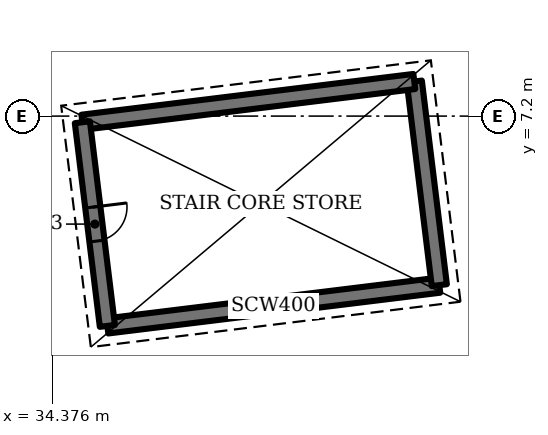
"""IFC4 building model, lengths in metres.
Left out: names, types, materials, properties, quantities, classifications, styles, units other than length and angle.
Written with IfcOpenShell. Run it as: python <this file> out.ifc"""

import sys

from ifc_helpers import new_model, si_unit, direction, frame, frame_2d, origin, place, context, subcontext, project, spatial, rectangle, extrude, element, fill, save


model = new_model("IFC4")
c1 = context("Model", 3, precision=1e-05, world=origin(), true_north=direction((0.0, 1.0)))
c2 = subcontext(c1, "Body", "Model", "MODEL_VIEW")
j1 = project(units=[si_unit("LENGTHUNIT", "METRE"), si_unit("PLANEANGLEUNIT", "RADIAN")], contexts=[c1])
p1 = place(None, origin())
s1 = spatial("IfcSite", under=j1, at=p1, CompositionType="ELEMENT")
p2 = place(p1, origin())
s2 = spatial("IfcBuilding", under=s1, at=p2, CompositionType="ELEMENT")
p3 = place(p2, frame((0.0, 0.0, -10.0)))
s3 = spatial("IfcBuildingStorey", under=s2, at=p3, CompositionType="ELEMENT", Elevation=-10.0)
p4 = place(p3, frame((35.823, 1.678, 0.0), z_axis=(0.0, 0.0, 1.0), x_axis=(0.992545280606, 0.121876437212, 0.0)))
e1 = element("IfcWall", 1, at=p4, inside=s3, PredefinedType="SHEAR", context=c2, shape_type="SweptSolid", body=[
    extrude(rectangle(XDim=8.8, YDim=0.4, at=frame_2d((4.4, 0.0))), origin(), (0.0, 0.0, 1.0), 4.5),
])
p5 = place(p3, frame((44.557, 2.751, 0.0), z_axis=(0.0, 0.0, 1.0), x_axis=(-0.12184754212, 0.99254882826, 0.0)))
e2 = element("IfcWall", 2, at=p5, inside=s3, PredefinedType="SHEAR", context=c2, shape_type="SweptSolid", body=[
    extrude(rectangle(XDim=5.4, YDim=0.4, at=frame_2d((2.7, 0.0))), origin(), (0.0, 0.0, 1.0), 4.5),
])
p6 = place(p3, frame((43.899, 8.11, 0.0), z_axis=(0.0, 0.0, 1.0), x_axis=(-0.992545280606, -0.121876437212, 0.0)))
e3 = element("IfcWall", 3, at=p6, inside=s3, PredefinedType="SHEAR", context=c2, shape_type="SweptSolid", body=[
    extrude(rectangle(XDim=8.8, YDim=0.4, at=frame_2d((4.4, 0.0))), origin(), (0.0, 0.0, 1.0), 4.5),
])
p7 = place(p3, frame((35.165, 7.038, 0.0), z_axis=(0.0, 0.0, 1.0), x_axis=(0.12184754212, -0.99254882826, 0.0)))
e4 = element("IfcWall", 4, at=p7, inside=s3, PredefinedType="SHEAR", context=c2, shape_type="SweptSolid", body=[
    extrude(rectangle(XDim=5.4, YDim=0.4, at=frame_2d((2.7, 0.0))), origin(), (0.0, 0.0, 1.0), 4.5),
])
p8 = place(p7, frame((2.25, 0.0, 0.0)))
e5 = element("IfcOpeningElement", 5, at=p8, cuts=e4, PredefinedType="OPENING", context=c2, shape_type="SweptSolid", body=[
    extrude(rectangle(XDim=0.9, YDim=2.1, at=frame_2d((0.45, 1.05))), frame((0.0, 0.21, 0.0), z_axis=(0.0, -1.0, 0.0), x_axis=(1.0, 0.0, 0.0)), (0.0, 0.0, 1.0), 0.42),
])
p9 = place(p8, origin())
e6 = element("IfcDoor", 6, at=p9, inside=s3, OperationType="SINGLE_SWING_LEFT", PredefinedType="DOOR", context=c2, shape_type="SweptSolid", body=[
    extrude(rectangle(XDim=0.9, YDim=2.1, at=frame_2d((0.45, 1.05))), frame((0.0, 0.025, 0.0), z_axis=(0.0, -1.0, 0.0), x_axis=(1.0, 0.0, 0.0)), (0.0, 0.0, 1.0), 0.05),
])
fill(e5, e6)
save(model, sys.argv[1])
